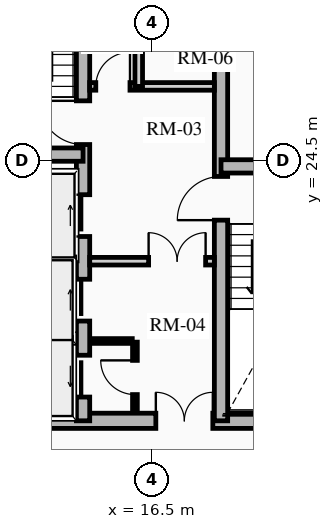
"""IFC4 building model, lengths in metres.
Left out: names, types, materials, properties, quantities, classifications, styles, units other than length and angle.
Written with IfcOpenShell. Run it as: python <this file> out.ifc"""

import sys

from ifc_helpers import new_model, si_unit, direction, frame, frame_2d, origin, place, context, subcontext, project, spatial, rectangle, extrude, source, transform, mapped, element, fill, save


model = new_model("IFC4")
c1 = context("Model", 3, precision=1e-05, world=origin(), true_north=direction((0.0, 1.0)))
c2 = subcontext(c1, "Body", "Model", "MODEL_VIEW")
j1 = project(units=[si_unit("LENGTHUNIT", "METRE"), si_unit("PLANEANGLEUNIT", "RADIAN")], contexts=[c1])
p1 = place(None, origin())
s1 = spatial("IfcSite", under=j1, at=p1, CompositionType="ELEMENT")
p2 = place(p1, origin())
s2 = spatial("IfcBuilding", under=s1, at=p2, CompositionType="ELEMENT")
p3 = place(p2, frame((0.0, 0.0, 157.42)))
s3 = spatial("IfcBuildingStorey", under=s2, at=p3, CompositionType="ELEMENT", Elevation=157.42)
p4 = place(p3, frame((11.15, 17.65, 0.0), z_axis=(0.0, 0.0, 1.0), x_axis=(1.0, 0.0, 0.0)))
e1 = element("IfcWall", 1, at=p4, inside=s3, PredefinedType="SHEAR", context=c2, shape_type="SweptSolid", body=[
    extrude(rectangle(XDim=10.7, YDim=0.4, at=frame_2d((5.35, 0.0))), origin(), (0.0, 0.0, 1.0), 2.91),
])
m1 = source(origin(), c2, "Body", "SweptSolid", [
    extrude(rectangle(XDim=1.5, YDim=2.02, at=frame_2d((0.75, 1.01))), frame((0.0, 0.21, 0.0), z_axis=(0.0, -1.0, 0.0), x_axis=(1.0, 0.0, 0.0)), (0.0, 0.0, 1.0), 0.42),
])
p5 = place(p4, frame((5.45, 0.0, 0.0)))
e2 = element("IfcOpeningElement", 2, at=p5, cuts=e1, PredefinedType="OPENING", context=c2, shape_type="MappedRepresentation", body=[
    mapped(m1, transform((0.0, 0.0, 0.0), x_axis=(1.0, 0.0, 0.0), y_axis=(0.0, 1.0, 0.0), z_axis=(0.0, 0.0, 1.0), scale=1.0)),
])
p6 = place(p3, frame((14.685, 17.65, 0.0), z_axis=(0.0, 0.0, 1.0), x_axis=(0.0, 1.0, 0.0)))
e3 = element("IfcWall", 3, at=p6, inside=s3, PredefinedType="SHEAR", context=c2, shape_type="SweptSolid", body=[
    extrude(rectangle(XDim=13.7, YDim=0.35, at=frame_2d((6.85, 0.0))), origin(), (0.0, 0.0, 1.0), 2.91),
])
m2 = source(origin(), c2, "Body", "SweptSolid", [
    extrude(rectangle(XDim=1.1, YDim=2.015, at=frame_2d((0.55, 1.007))), frame((0.0, 0.185, 0.0), z_axis=(0.0, -1.0, 0.0), x_axis=(1.0, 0.0, 0.0)), (0.0, 0.0, 1.0), 0.37),
])
p7 = place(p6, frame((4.85, 0.0, 0.0)))
e4 = element("IfcOpeningElement", 4, at=p7, cuts=e3, PredefinedType="OPENING", context=c2, shape_type="MappedRepresentation", body=[
    mapped(m2, transform((0.0, 0.0, 0.0), x_axis=(1.0, 0.0, 0.0), y_axis=(0.0, 1.0, 0.0), z_axis=(0.0, 0.0, 1.0), scale=1.0)),
])
p8 = place(p6, frame((0.625, 0.0, 0.0)))
e5 = element("IfcOpeningElement", 5, at=p8, cuts=e3, PredefinedType="OPENING", context=c2, shape_type="MappedRepresentation", body=[
    mapped(m2, transform((0.0, 0.0, 0.0), x_axis=(1.0, 0.0, 0.0), y_axis=(0.0, 1.0, 0.0), z_axis=(0.0, 0.0, 1.0), scale=1.0)),
])
p9 = place(p6, frame((2.625, 0.0, 0.0)))
e6 = element("IfcOpeningElement", 6, at=p9, cuts=e3, PredefinedType="OPENING", context=c2, shape_type="MappedRepresentation", body=[
    mapped(m2, transform((0.0, 0.0, 0.0), x_axis=(1.0, 0.0, 0.0), y_axis=(0.0, 1.0, 0.0), z_axis=(0.0, 0.0, 1.0), scale=1.0)),
])
m3 = source(origin(), c2, "Body", "SweptSolid", [
    extrude(rectangle(XDim=1.15, YDim=2.02, at=frame_2d((0.575, 1.01))), frame((0.0, 0.185, 0.0), z_axis=(0.0, -1.0, 0.0), x_axis=(1.0, 0.0, 0.0)), (0.0, 0.0, 1.0), 0.37),
])
p10 = place(p6, frame((7.27, 0.0, 0.0)))
e7 = element("IfcOpeningElement", 7, at=p10, cuts=e3, PredefinedType="OPENING", context=c2, shape_type="MappedRepresentation", body=[
    mapped(m3, transform((0.0, 0.0, 0.0), x_axis=(1.0, 0.0, 0.0), y_axis=(0.0, 1.0, 0.0), z_axis=(0.0, 0.0, 1.0), scale=1.0)),
])
p11 = place(p3, frame((18.315, 17.65, 0.0), z_axis=(0.0, 0.0, 1.0), x_axis=(0.0, 1.0, 0.0)))
e8 = element("IfcWall", 8, at=p11, inside=s3, PredefinedType="SHEAR", context=c2, shape_type="SweptSolid", body=[
    extrude(rectangle(XDim=9.6, YDim=0.35, at=frame_2d((4.8, 0.0))), origin(), (0.0, 0.0, 1.0), 2.91),
])
p12 = place(p11, frame((5.28, 0.0, 0.0)))
e9 = element("IfcOpeningElement", 9, at=p12, cuts=e8, PredefinedType="OPENING", context=c2, shape_type="MappedRepresentation", body=[
    mapped(m3, transform((0.0, 0.0, 0.0), x_axis=(1.0, 0.0, 0.0), y_axis=(0.0, 1.0, 0.0), z_axis=(0.0, 0.0, 1.0), scale=1.0)),
])
for number, where, z_axis, x_axis in (
    (10, (11.4, 24.655, 0.0), (0.0, 0.0, 1.0), (1.0, 0.0, 0.0)),
    (11, (18.315, 24.345, 0.0), (0.0, 0.0, 1.0), (1.0, 0.0, 0.0)),
):
    element("IfcWall", number, at=place(p3, frame(where, z_axis=z_axis, x_axis=x_axis)), inside=s3, PredefinedType="SHEAR", context=c2, shape_type="SweptSolid", body=[
        extrude(rectangle(XDim=3.285, YDim=0.35, at=frame_2d((1.643, 0.0))), origin(), (0.0, 0.0, 1.0), 2.91),
    ])
for number, where, z_axis, x_axis in (
    (12, (11.52, 21.8, 0.0), (0.0, 0.0, 1.0), (1.0, 0.0, 0.0)),
    (13, (11.52, 19.825, 0.0), (0.0, 0.0, 1.0), (1.0, 0.0, 0.0)),
):
    element("IfcWall", number, at=place(p3, frame(where, z_axis=z_axis, x_axis=x_axis)), inside=s3, PredefinedType="SHEAR", context=c2, shape_type="SweptSolid", body=[
        extrude(rectangle(XDim=2.97, YDim=0.2, at=frame_2d((1.485, 0.0))), origin(), (0.0, 0.0, 1.0), 2.91),
    ])
p13 = place(p3, frame((14.86, 21.85, 0.0), z_axis=(0.0, 0.0, 1.0), x_axis=(1.0, 0.0, 0.0)))
e14 = element("IfcWall", 14, at=p13, inside=s3, PredefinedType="PARTITIONING", context=c2, shape_type="SweptSolid", body=[
    extrude(rectangle(XDim=3.28, YDim=0.2, at=frame_2d((1.64, 0.0))), origin(), (0.0, 0.0, 1.0), 2.675),
])
m4 = source(origin(), c2, "Body", "SweptSolid", [
    extrude(rectangle(XDim=1.5, YDim=2.02, at=frame_2d((0.75, 1.01))), frame((0.0, 0.11, 0.0), z_axis=(0.0, -1.0, 0.0), x_axis=(1.0, 0.0, 0.0)), (0.0, 0.0, 1.0), 0.22),
])
p14 = place(p13, frame((1.55, 0.0, 0.0)))
e15 = element("IfcOpeningElement", 15, at=p14, cuts=e14, PredefinedType="OPENING", context=c2, shape_type="MappedRepresentation", body=[
    mapped(m4, transform((0.0, 0.0, 0.0), x_axis=(1.0, 0.0, 0.0), y_axis=(0.0, 1.0, 0.0), z_axis=(0.0, 0.0, 1.0), scale=1.0)),
])
p15 = place(p3, frame((14.86, 26.45, 0.0), z_axis=(0.0, 0.0, 1.0), x_axis=(1.0, 0.0, 0.0)))
e16 = element("IfcWall", 16, at=p15, inside=s3, PredefinedType="PARTITIONING", context=c2, shape_type="SweptSolid", body=[
    extrude(rectangle(XDim=3.28, YDim=0.2, at=frame_2d((1.64, 0.0))), origin(), (0.0, 0.0, 1.0), 2.675),
])
m5 = source(origin(), c2, "Body", "SweptSolid", [
    extrude(rectangle(XDim=0.9, YDim=2.005, at=frame_2d((0.45, 1.002))), frame((0.0, 0.11, 0.0), z_axis=(0.0, -1.0, 0.0), x_axis=(1.0, 0.0, 0.0)), (0.0, 0.0, 1.0), 0.22),
])
p16 = place(p15, frame((0.16, 0.0, 0.0)))
e17 = element("IfcOpeningElement", 17, at=p16, cuts=e16, PredefinedType="OPENING", context=c2, shape_type="MappedRepresentation", body=[
    mapped(m5, transform((0.0, 0.0, 0.0), x_axis=(1.0, 0.0, 0.0), y_axis=(0.0, 1.0, 0.0), z_axis=(0.0, 0.0, 1.0), scale=1.0)),
])
p17 = place(p3, frame((16.15, 26.45, 0.0), z_axis=(0.0, 0.0, 1.0), x_axis=(0.0, 1.0, 0.0)))
e18 = element("IfcWall", 18, at=p17, inside=s3, PredefinedType="PARTITIONING", context=c2, shape_type="SweptSolid", body=[
    extrude(rectangle(XDim=2.4, YDim=0.2, at=frame_2d((1.2, 0.0))), origin(), (0.0, 0.0, 1.0), 2.675),
])
p18 = place(p3, frame((16.05, 17.92, 0.0), z_axis=(0.0, 0.0, 1.0), x_axis=(0.0, 1.0, 0.0)))
e19 = element("IfcWall", 19, at=p18, inside=s3, PredefinedType="PARTITIONING", context=c2, shape_type="SweptSolid", body=[
    extrude(rectangle(XDim=1.8, YDim=0.125, at=frame_2d((0.9, 0.0))), origin(), (0.0, 0.0, 1.0), 2.675),
])
m6 = source(origin(), c2, "Body", "SweptSolid", [
    extrude(rectangle(XDim=0.9, YDim=2.005, at=frame_2d((0.45, 1.002))), frame((0.0, 0.073, 0.0), z_axis=(0.0, -1.0, 0.0), x_axis=(1.0, 0.0, 0.0)), (0.0, 0.0, 1.0), 0.145),
])
p19 = place(p18, frame((0.42, 0.0, 0.0)))
e20 = element("IfcOpeningElement", 20, at=p19, cuts=e19, PredefinedType="OPENING", context=c2, shape_type="MappedRepresentation", body=[
    mapped(m6, transform((0.0, 0.0, 0.0), x_axis=(1.0, 0.0, 0.0), y_axis=(0.0, 1.0, 0.0), z_axis=(0.0, 0.0, 1.0), scale=1.0)),
])
p20 = place(p3, frame((14.88, 19.75, 0.0), z_axis=(0.0, 0.0, 1.0), x_axis=(1.0, 0.0, 0.0)))
e21 = element("IfcWall", 21, at=p20, inside=s3, PredefinedType="PARTITIONING", context=c2, shape_type="SweptSolid", body=[
    extrude(rectangle(XDim=1.1, YDim=0.125, at=frame_2d((0.55, 0.0))), origin(), (0.0, 0.0, 1.0), 2.675),
])
p21 = place(p3, frame((18.315, 27.25, 0.0), z_axis=(0.0, 0.0, 1.0), x_axis=(0.0, 1.0, 0.0)))
e22 = element("IfcWall", 22, at=p21, inside=s3, PredefinedType="PARTITIONING", context=c2, shape_type="SweptSolid", body=[
    extrude(rectangle(XDim=3.9, YDim=0.16, at=frame_2d((1.95, 0.0))), origin(), (0.0, 0.0, 1.0), 2.675),
])
m7 = source(origin(), c2, "Body", "SweptSolid", [
    extrude(rectangle(XDim=0.9, YDim=2.005, at=frame_2d((0.45, 1.002))), frame((0.0, 0.09, 0.0), z_axis=(0.0, -1.0, 0.0), x_axis=(1.0, 0.0, 0.0)), (0.0, 0.0, 1.0), 0.18),
])
p22 = place(p21, frame((2.2, 0.0, 0.0)))
e23 = element("IfcOpeningElement", 23, at=p22, cuts=e22, PredefinedType="OPENING", context=c2, shape_type="MappedRepresentation", body=[
    mapped(m7, transform((0.0, 0.0, 0.0), x_axis=(1.0, 0.0, 0.0), y_axis=(0.0, 1.0, 0.0), z_axis=(0.0, 0.0, 1.0), scale=1.0)),
])
m8 = source(origin(), c2, "Body", "SweptSolid", [
    extrude(rectangle(XDim=1.1, YDim=2.015, at=frame_2d((0.55, 1.007))), frame((0.0, 0.025, 0.0), z_axis=(0.0, -1.0, 0.0), x_axis=(1.0, 0.0, 0.0)), (0.0, 0.0, 1.0), 0.05),
])
p23 = place(p7, origin())
e24 = element("IfcDoor", 24, at=p23, inside=s3, OperationType="SLIDING_TO_RIGHT", PredefinedType="DOOR", context=c2, shape_type="MappedRepresentation", body=[
    mapped(m8, transform((0.0, 0.0, 0.0), x_axis=(1.0, 0.0, 0.0), y_axis=(0.0, 1.0, 0.0), z_axis=(0.0, 0.0, 1.0), scale=1.0)),
])
fill(e4, e24)
p24 = place(p8, origin())
e25 = element("IfcDoor", 25, at=p24, inside=s3, OperationType="SLIDING_TO_LEFT", PredefinedType="DOOR", context=c2, shape_type="MappedRepresentation", body=[
    mapped(m8, transform((0.0, 0.0, 0.0), x_axis=(1.0, 0.0, 0.0), y_axis=(0.0, 1.0, 0.0), z_axis=(0.0, 0.0, 1.0), scale=1.0)),
])
fill(e5, e25)
p25 = place(p9, origin())
e26 = element("IfcDoor", 26, at=p25, inside=s3, OperationType="SLIDING_TO_RIGHT", PredefinedType="DOOR", context=c2, shape_type="MappedRepresentation", body=[
    mapped(m8, transform((0.0, 0.0, 0.0), x_axis=(1.0, 0.0, 0.0), y_axis=(0.0, 1.0, 0.0), z_axis=(0.0, 0.0, 1.0), scale=1.0)),
])
fill(e6, e26)
m9 = source(origin(), c2, "Body", "SweptSolid", [
    extrude(rectangle(XDim=1.15, YDim=2.02, at=frame_2d((0.575, 1.01))), frame((0.0, 0.025, 0.0), z_axis=(0.0, -1.0, 0.0), x_axis=(1.0, 0.0, 0.0)), (0.0, 0.0, 1.0), 0.05),
])
p26 = place(p10, origin())
e27 = element("IfcDoor", 27, at=p26, inside=s3, OperationType="SINGLE_SWING_RIGHT", PredefinedType="DOOR", context=c2, shape_type="MappedRepresentation", body=[
    mapped(m9, transform((0.0, 0.0, 0.0), x_axis=(1.0, 0.0, 0.0), y_axis=(0.0, 1.0, 0.0), z_axis=(0.0, 0.0, 1.0), scale=1.0)),
])
fill(e7, e27)
p27 = place(p12, origin())
e28 = element("IfcDoor", 28, at=p27, inside=s3, OperationType="SINGLE_SWING_LEFT", PredefinedType="DOOR", context=c2, shape_type="MappedRepresentation", body=[
    mapped(m9, transform((0.0, 0.0, 0.0), x_axis=(1.0, 0.0, 0.0), y_axis=(0.0, 1.0, 0.0), z_axis=(0.0, 0.0, 1.0), scale=1.0)),
])
fill(e9, e28)
m10 = source(origin(), c2, "Body", "SweptSolid", [
    extrude(rectangle(XDim=1.5, YDim=2.02, at=frame_2d((0.75, 1.01))), frame((0.0, 0.025, 0.0), z_axis=(0.0, -1.0, 0.0), x_axis=(1.0, 0.0, 0.0)), (0.0, 0.0, 1.0), 0.05),
])
p28 = place(p5, origin())
e29 = element("IfcDoor", 29, at=p28, inside=s3, OperationType="DOUBLE_DOOR_SINGLE_SWING", PredefinedType="DOOR", context=c2, shape_type="MappedRepresentation", body=[
    mapped(m10, transform((0.0, 0.0, 0.0), x_axis=(1.0, 0.0, 0.0), y_axis=(0.0, 1.0, 0.0), z_axis=(0.0, 0.0, 1.0), scale=1.0)),
])
fill(e2, e29)
p29 = place(p14, origin())
e30 = element("IfcDoor", 30, at=p29, inside=s3, OperationType="DOUBLE_DOOR_SINGLE_SWING", PredefinedType="DOOR", context=c2, shape_type="MappedRepresentation", body=[
    mapped(m10, transform((0.0, 0.0, 0.0), x_axis=(1.0, 0.0, 0.0), y_axis=(0.0, 1.0, 0.0), z_axis=(0.0, 0.0, 1.0), scale=1.0)),
])
fill(e15, e30)
m11 = source(origin(), c2, "Body", "SweptSolid", [
    extrude(rectangle(XDim=0.9, YDim=2.005, at=frame_2d((0.45, 1.002))), frame((0.0, 0.025, 0.0), z_axis=(0.0, -1.0, 0.0), x_axis=(1.0, 0.0, 0.0)), (0.0, 0.0, 1.0), 0.05),
])
p30 = place(p16, origin())
e31 = element("IfcDoor", 31, at=p30, inside=s3, OperationType="SINGLE_SWING_RIGHT", PredefinedType="DOOR", context=c2, shape_type="MappedRepresentation", body=[
    mapped(m11, transform((0.0, 0.0, 0.0), x_axis=(1.0, 0.0, 0.0), y_axis=(0.0, 1.0, 0.0), z_axis=(0.0, 0.0, 1.0), scale=1.0)),
])
fill(e17, e31)
p31 = place(p19, origin())
e32 = element("IfcDoor", 32, at=p31, inside=s3, OperationType="SINGLE_SWING_RIGHT", PredefinedType="DOOR", context=c2, shape_type="MappedRepresentation", body=[
    mapped(m11, transform((0.0, 0.0, 0.0), x_axis=(1.0, 0.0, 0.0), y_axis=(0.0, 1.0, 0.0), z_axis=(0.0, 0.0, 1.0), scale=1.0)),
])
fill(e20, e32)
save(model, sys.argv[1])
